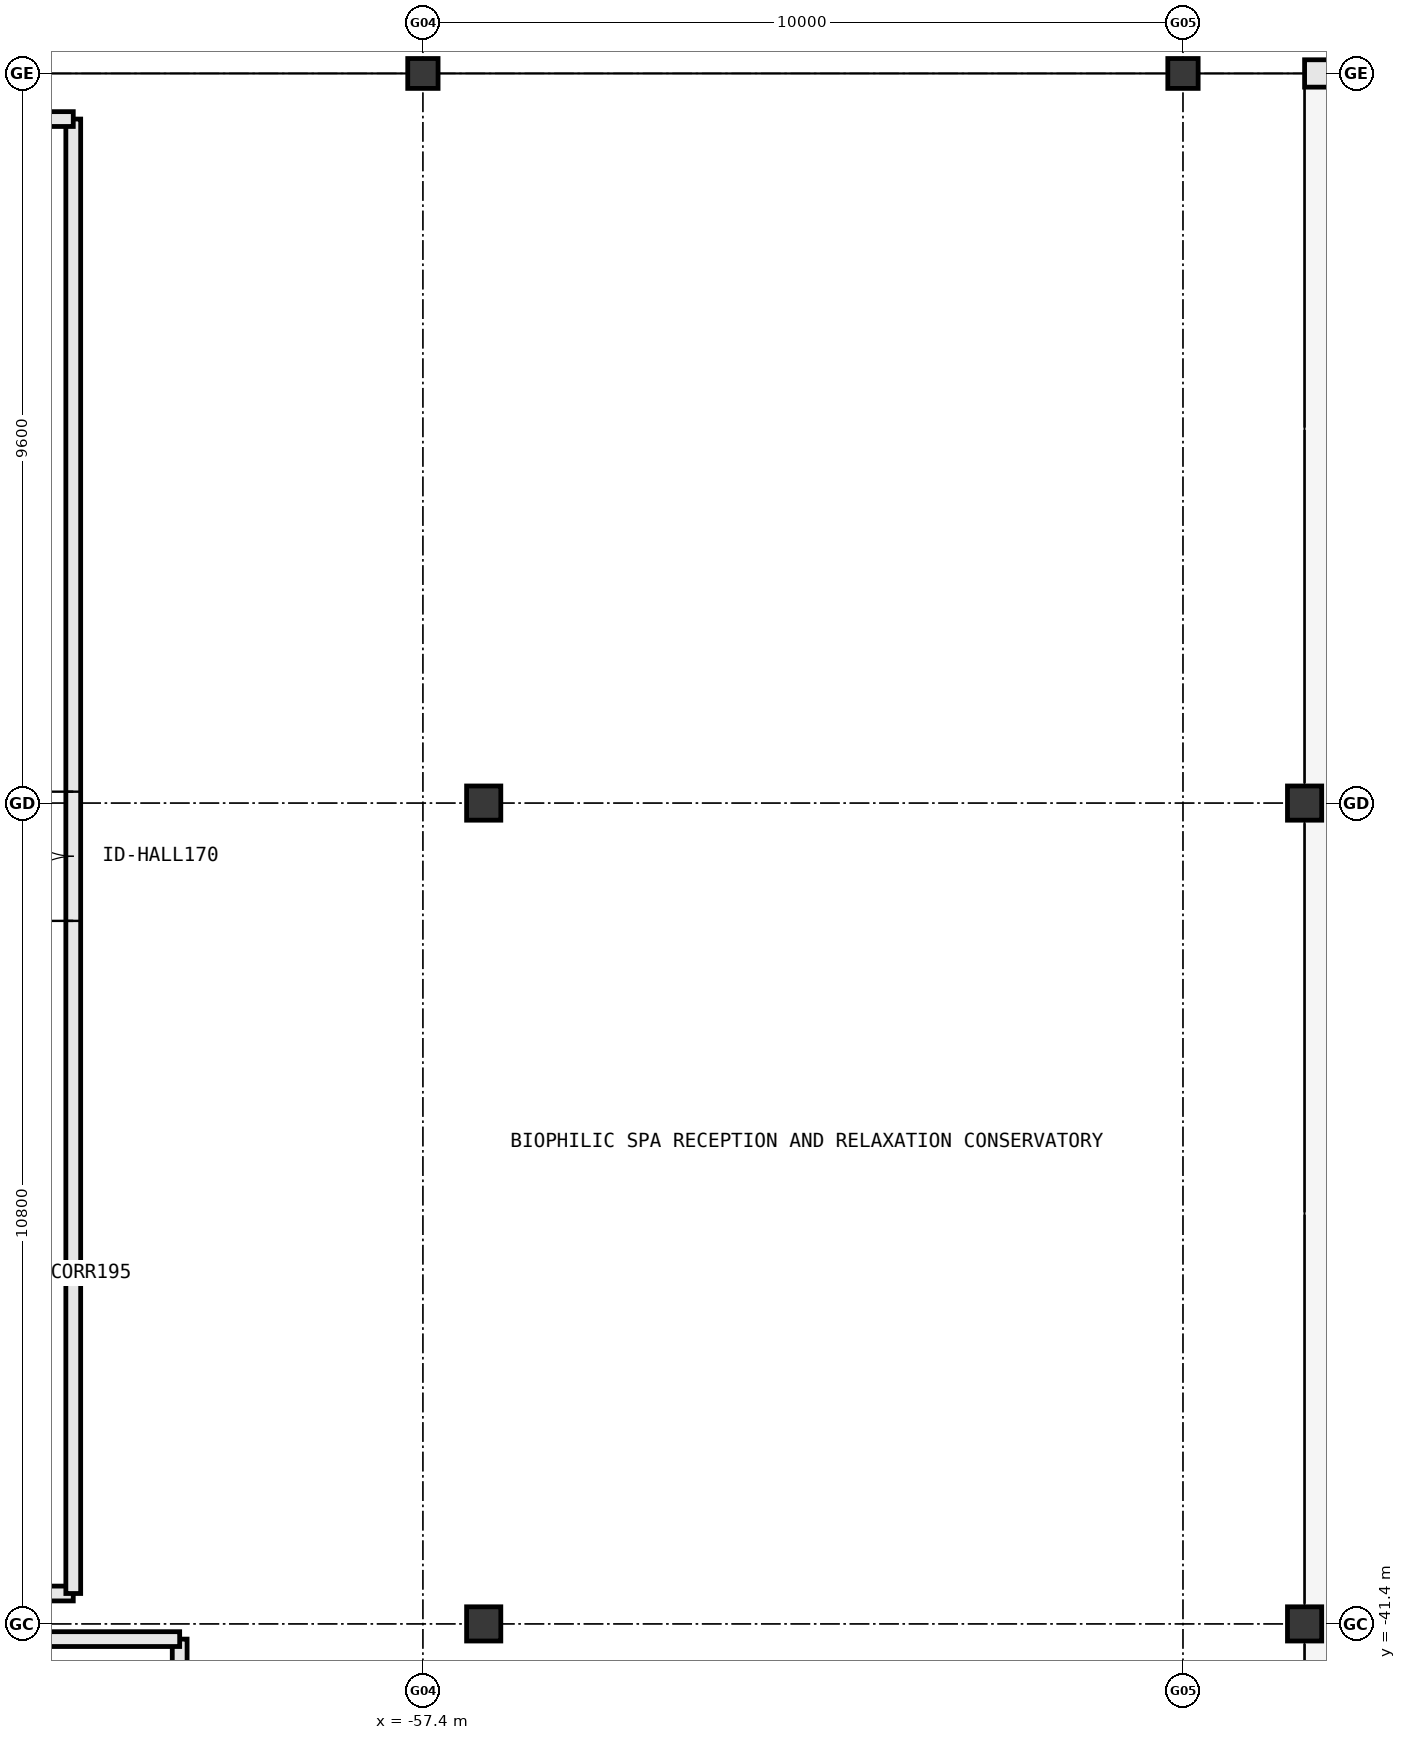
"""IFC4 building model, lengths in metres.
Left out: names, types, materials, properties, quantities, classifications, styles, units other than length and angle.
Written with IfcOpenShell. Run it as: python <this file> out.ifc"""

import sys

from ifc_helpers import new_model, si_unit, direction, frame, frame_2d, origin, origin_2d, place, context, subcontext, project, spatial, rectangle, i_section, extrude, element, fill, save


model = new_model("IFC4")
c1 = context("Model", 3, precision=1e-05, world=origin(), true_north=direction((0.0, 1.0)))
c2 = subcontext(c1, "Body", "Model", "MODEL_VIEW")
j1 = project(units=[si_unit("LENGTHUNIT", "METRE"), si_unit("PLANEANGLEUNIT", "RADIAN")], contexts=[c1])
p1 = place(None, origin())
s1 = spatial("IfcSite", under=j1, at=p1, CompositionType="ELEMENT")
p2 = place(p1, origin())
s2 = spatial("IfcBuilding", under=s1, at=p2, CompositionType="ELEMENT")
p3 = place(p2, origin())
s3 = spatial("IfcBuildingStorey", under=s2, at=p3, CompositionType="ELEMENT", Elevation=0.0)
for number, where, z_axis, x_axis in (
    (1, (-57.4, -21.0, 0.0), (0.0, 0.0, 1.0), (1.0, 0.0, 0.0)),
    (2, (-47.4, -21.0, 0.0), (0.0, 0.0, 1.0), (1.0, 0.0, 0.0)),
):
    element("IfcColumn", number, at=place(p3, frame(where, z_axis=z_axis, x_axis=x_axis)), inside=s3, PredefinedType="COLUMN", context=c2, shape_type="SweptSolid", body=[
        extrude(i_section(OverallWidth=0.399, OverallDepth=0.393, WebThickness=0.023, FlangeThickness=0.037, at=origin_2d()), origin(), (0.0, 0.0, 1.0), 5.4),
    ])
for number, where, z_axis, x_axis in (
    (3, (-56.6, -41.4, 0.0), (0.0, 0.0, 1.0), (1.0, 0.0, 0.0)),
    (4, (-56.6, -30.6, 0.0), (0.0, 0.0, 1.0), (1.0, 0.0, 0.0)),
    (5, (-45.8, -41.4, 0.0), (0.0, 0.0, 1.0), (1.0, 0.0, 0.0)),
    (6, (-45.8, -30.6, 0.0), (0.0, 0.0, 1.0), (1.0, 0.0, 0.0)),
):
    element("IfcColumn", number, at=place(p3, frame(where, z_axis=z_axis, x_axis=x_axis)), inside=s3, PredefinedType="COLUMN", context=c2, shape_type="SweptSolid", body=[
        extrude(rectangle(XDim=0.45, YDim=0.45, at=origin_2d()), origin(), (0.0, 0.0, 1.0), 5.4),
    ])
p4 = place(p3, frame((-45.8, -21.0, 0.0), z_axis=(0.0, 0.0, 1.0), x_axis=(1.0, 0.0, 0.0)))
e7 = element("IfcWall", 7, at=p4, inside=s3, PredefinedType="STANDARD", context=c2, shape_type="SweptSolid", body=[
    extrude(rectangle(XDim=8.391, YDim=0.36, at=frame_2d((4.195, 0.0))), origin(), (0.0, 0.0, 1.0), 4.414),
])
p5 = place(p4, frame((2.995, 0.0, 0.85)))
e8 = element("IfcOpeningElement", 8, at=p5, cuts=e7, PredefinedType="OPENING", context=c2, shape_type="SweptSolid", body=[
    extrude(rectangle(XDim=2.4, YDim=2.05, at=frame_2d((1.2, 1.025))), frame((0.0, 0.192, 0.0), z_axis=(0.0, -1.0, 0.0), x_axis=(1.0, 0.0, 0.0)), (0.0, 0.0, 1.0), 0.384),
])
p6 = place(p3, frame((-77.6, -41.0, 0.0), z_axis=(0.0, 0.0, 1.0), x_axis=(1.0, 0.0, 0.0)))
e9 = element("IfcWall", 9, at=p6, inside=s3, PredefinedType="PARTITIONING", context=c2, shape_type="SweptSolid", body=[
    extrude(rectangle(XDim=15.6, YDim=0.195, at=frame_2d((7.8, 0.0))), origin(), (0.0, 0.0, 1.0), 4.336),
])
p7 = place(p3, frame((-62.0, -41.0, 0.0), z_axis=(0.0, 0.0, 1.0), x_axis=(0.0, 1.0, 0.0)))
e10 = element("IfcWall", 10, at=p7, inside=s3, PredefinedType="PARTITIONING", context=c2, shape_type="SweptSolid", body=[
    extrude(rectangle(XDim=19.4, YDim=0.195, at=frame_2d((9.7, 0.0))), origin(), (0.0, 0.0, 1.0), 5.12),
])
p8 = place(p7, frame((8.85, 0.0, 0.0)))
e11 = element("IfcOpeningElement", 11, at=p8, cuts=e10, PredefinedType="OPENING", context=c2, shape_type="SweptSolid", body=[
    extrude(rectangle(XDim=1.7, YDim=2.3, at=frame_2d((0.85, 1.15))), frame((0.0, 0.11, 0.0), z_axis=(0.0, -1.0, 0.0), x_axis=(1.0, 0.0, 0.0)), (0.0, 0.0, 1.0), 0.219),
])
p9 = place(p3, frame((-62.0, -21.6, 0.0), z_axis=(0.0, 0.0, 1.0), x_axis=(-1.0, 0.0, 0.0)))
e12 = element("IfcWall", 12, at=p9, inside=s3, PredefinedType="PARTITIONING", context=c2, shape_type="SweptSolid", body=[
    extrude(rectangle(XDim=15.6, YDim=0.195, at=frame_2d((7.8, 0.0))), origin(), (0.0, 0.0, 1.0), 5.12),
])
p10 = place(p3, frame((-60.6, -51.6, 0.0), z_axis=(0.0, 0.0, 1.0), x_axis=(0.0, 1.0, 0.0)))
e13 = element("IfcWall", 13, at=p10, inside=s3, PredefinedType="PARTITIONING", context=c2, shape_type="SweptSolid", body=[
    extrude(rectangle(XDim=10.0, YDim=0.195, at=frame_2d((5.0, 0.0))), origin(), (0.0, 0.0, 1.0), 5.12),
])
p11 = place(p3, frame((-60.6, -41.6, 0.0), z_axis=(0.0, 0.0, 1.0), x_axis=(-1.0, 0.0, 0.0)))
e14 = element("IfcWall", 14, at=p11, inside=s3, PredefinedType="PARTITIONING", context=c2, shape_type="SweptSolid", body=[
    extrude(rectangle(XDim=12.0, YDim=0.195, at=frame_2d((6.0, 0.0))), origin(), (0.0, 0.0, 1.0), 4.336),
])
p12 = place(p11, frame((4.099, 0.0, 0.0)))
e15 = element("IfcOpeningElement", 15, at=p12, cuts=e14, PredefinedType="OPENING", context=c2, shape_type="SweptSolid", body=[
    extrude(rectangle(XDim=1.15, YDim=2.2, at=frame_2d((0.575, 1.1))), frame((0.0, 0.11, 0.0), z_axis=(0.0, -1.0, 0.0), x_axis=(1.0, 0.0, 0.0)), (0.0, 0.0, 1.0), 0.219),
])
p13 = place(p8, origin())
e16 = element("IfcDoor", 16, at=p13, inside=s3, OperationType="DOUBLE_DOOR_SINGLE_SWING", PredefinedType="DOOR", context=c2, shape_type="SweptSolid", body=[
    extrude(rectangle(XDim=1.7, YDim=2.3, at=frame_2d((0.85, 1.15))), frame((0.0, 0.025, 0.0), z_axis=(0.0, -1.0, 0.0), x_axis=(1.0, 0.0, 0.0)), (0.0, 0.0, 1.0), 0.05),
])
fill(e11, e16)
save(model, sys.argv[1])
